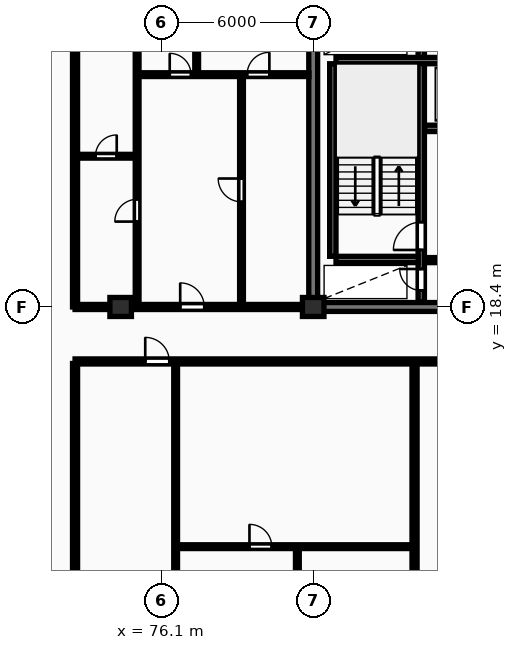
"""IFC4 building model, lengths in metres.
Left out: names, types, materials, properties, quantities, classifications, styles, units other than length and angle.
Written with IfcOpenShell. Run it as: python <this file> out.ifc"""

import sys

from ifc_helpers import new_model, si_unit, direction, frame, frame_2d, origin, origin_2d, place, context, subcontext, project, spatial, rectangle, extrude, element, fill, save


model = new_model("IFC4")
c1 = context("Model", 3, precision=1e-05, world=origin(), true_north=direction((0.0, 1.0)))
c2 = subcontext(c1, "Body", "Model", "MODEL_VIEW")
j1 = project(units=[si_unit("LENGTHUNIT", "METRE"), si_unit("PLANEANGLEUNIT", "RADIAN")], contexts=[c1])
p1 = place(None, origin())
s1 = spatial("IfcSite", under=j1, at=p1, CompositionType="ELEMENT")
p2 = place(p1, origin())
s2 = spatial("IfcBuilding", under=s1, at=p2, CompositionType="ELEMENT")
p3 = place(p2, frame((0.0, 0.0, 80.8)))
s3 = spatial("IfcBuildingStorey", under=s2, at=p3, CompositionType="ELEMENT", Elevation=80.8)
for number, where, z_axis, x_axis in (
    (1, (74.5, 18.4, 0.0), (0.0, 0.0, 1.0), (1.0, 0.0, 0.0)),
    (2, (82.1, 18.4, 0.0), (0.0, 0.0, 1.0), (1.0, 0.0, 0.0)),
):
    element("IfcColumn", number, at=place(p3, frame(where, z_axis=z_axis, x_axis=x_axis)), inside=s3, PredefinedType="COLUMN", context=c2, shape_type="SweptSolid", body=[
        extrude(rectangle(XDim=0.85, YDim=0.75, at=origin_2d()), origin(), (0.0, 0.0, 1.0), 3.25),
    ])
p4 = place(p3, frame((82.1, 18.575, 0.0), z_axis=(0.0, 0.0, 1.0), x_axis=(0.0, 1.0, 0.0)))
e3 = element("IfcWall", 3, at=p4, inside=s3, PredefinedType="SHEAR", context=c2, shape_type="SweptSolid", body=[
    extrude(rectangle(XDim=11.65, YDim=0.35, at=frame_2d((5.825, 0.0))), origin(), (0.0, 0.0, 1.0), 3.25),
])
p5 = place(p3, frame((81.925, 18.4, 0.0), z_axis=(0.0, 0.0, 1.0), x_axis=(1.0, 0.0, 0.0)))
e4 = element("IfcWall", 4, at=p5, inside=s3, PredefinedType="SHEAR", context=c2, shape_type="SweptSolid", body=[
    extrude(rectangle(XDim=36.265, YDim=0.35, at=frame_2d((18.132, 0.0))), origin(), (0.0, 0.0, 1.0), 3.25),
])
p6 = place(p5, frame((5.675, 0.0, 0.0)))
e5 = element("IfcOpeningElement", 5, at=p6, cuts=e4, PredefinedType="OPENING", context=c2, shape_type="SweptSolid", body=[
    extrude(rectangle(XDim=1.0, YDim=2.15, at=frame_2d((0.5, 1.075))), frame((0.0, 0.185, 0.0), z_axis=(0.0, -1.0, 0.0), x_axis=(1.0, 0.0, 0.0)), (0.0, 0.0, 1.0), 0.37),
])
p7 = place(p5, frame((21.925, 0.0, 0.0)))
e6 = element("IfcOpeningElement", 6, at=p7, cuts=e4, PredefinedType="OPENING", context=c2, shape_type="SweptSolid", body=[
    extrude(rectangle(XDim=1.5, YDim=2.2, at=frame_2d((0.75, 1.1))), frame((0.0, 0.185, 0.0), z_axis=(0.0, -1.0, 0.0), x_axis=(1.0, 0.0, 0.0)), (0.0, 0.0, 1.0), 0.37),
])
p8 = place(p5, frame((29.875, 0.0, 0.0)))
e7 = element("IfcOpeningElement", 7, at=p8, cuts=e4, PredefinedType="OPENING", context=c2, shape_type="SweptSolid", body=[
    extrude(rectangle(XDim=1.0, YDim=2.15, at=frame_2d((0.5, 1.075))), frame((0.0, 0.185, 0.0), z_axis=(0.0, -1.0, 0.0), x_axis=(1.0, 0.0, 0.0)), (0.0, 0.0, 1.0), 0.37),
])
p9 = place(p3, frame((82.875, 20.4, 0.0), z_axis=(0.0, 0.0, 1.0), x_axis=(0.0, 1.0, 0.0)))
e8 = element("IfcWall", 8, at=p9, inside=s3, PredefinedType="SHEAR", context=c2, shape_type="SweptSolid", body=[
    extrude(rectangle(XDim=7.6, YDim=0.25, at=frame_2d((3.8, 0.0))), origin(), (0.0, 0.0, 1.0), 3.25),
])
p10 = place(p3, frame((86.365, 18.6, 0.0), z_axis=(0.0, 0.0, 1.0), x_axis=(0.0, 1.0, 0.0)))
e9 = element("IfcWall", 9, at=p10, inside=s3, PredefinedType="SHEAR", context=c2, shape_type="SweptSolid", body=[
    extrude(rectangle(XDim=11.6, YDim=0.25, at=frame_2d((5.8, 0.0))), origin(), (0.0, 0.0, 1.0), 3.25),
])
p11 = place(p10, frame((0.45, 0.0, 0.0)))
e10 = element("IfcOpeningElement", 10, at=p11, cuts=e9, PredefinedType="OPENING", context=c2, shape_type="SweptSolid", body=[
    extrude(rectangle(XDim=0.85, YDim=2.05, at=frame_2d((0.425, 1.025))), frame((0.0, 0.135, 0.0), z_axis=(0.0, -1.0, 0.0), x_axis=(1.0, 0.0, 0.0)), (0.0, 0.0, 1.0), 0.27),
])
p12 = place(p10, frame((2.05, 0.0, 0.0)))
e11 = element("IfcOpeningElement", 11, at=p12, cuts=e9, PredefinedType="OPENING", context=c2, shape_type="SweptSolid", body=[
    extrude(rectangle(XDim=1.1, YDim=2.1, at=frame_2d((0.55, 1.05))), frame((0.0, 0.135, 0.0), z_axis=(0.0, -1.0, 0.0), x_axis=(1.0, 0.0, 0.0)), (0.0, 0.0, 1.0), 0.27),
])
p13 = place(p10, frame((9.95, 0.0, 0.0)))
e12 = element("IfcOpeningElement", 12, at=p13, cuts=e9, PredefinedType="OPENING", context=c2, shape_type="SweptSolid", body=[
    extrude(rectangle(XDim=0.85, YDim=2.05, at=frame_2d((0.425, 1.025))), frame((0.0, 0.135, 0.0), z_axis=(0.0, -1.0, 0.0), x_axis=(1.0, 0.0, 0.0)), (0.0, 0.0, 1.0), 0.27),
])
p14 = place(p3, frame((83.0, 20.275, 0.0), z_axis=(0.0, 0.0, 1.0), x_axis=(1.0, 0.0, 0.0)))
e13 = element("IfcWall", 13, at=p14, inside=s3, PredefinedType="SHEAR", context=c2, shape_type="SweptSolid", body=[
    extrude(rectangle(XDim=3.24, YDim=0.25, at=frame_2d((1.62, 0.0))), origin(), (0.0, 0.0, 1.0), 3.25),
])
p15 = place(p3, frame((83.0, 28.125, 0.0), z_axis=(0.0, 0.0, 1.0), x_axis=(1.0, 0.0, 0.0)))
e14 = element("IfcWall", 14, at=p15, inside=s3, PredefinedType="SHEAR", context=c2, shape_type="SweptSolid", body=[
    extrude(rectangle(XDim=7.82, YDim=0.25, at=frame_2d((3.91, 0.0))), origin(), (0.0, 0.0, 1.0), 3.25),
])
p16 = place(p3, frame((86.5, 25.45, 0.0), z_axis=(0.0, 0.0, 1.0), x_axis=(1.0, 0.0, 0.0)))
e15 = element("IfcWall", 15, at=p16, inside=s3, PredefinedType="SHEAR", context=c2, shape_type="SweptSolid", body=[
    extrude(rectangle(XDim=4.32, YDim=0.25, at=frame_2d((2.16, 0.0))), origin(), (0.0, 0.0, 1.0), 3.25),
])
p17 = place(p16, frame((1.14, 0.0, 0.0)))
e16 = element("IfcOpeningElement", 16, at=p17, cuts=e15, PredefinedType="OPENING", context=c2, shape_type="SweptSolid", body=[
    extrude(rectangle(XDim=1.12, YDim=2.12, at=frame_2d((0.56, 1.06))), frame((0.0, 0.135, 0.0), z_axis=(0.0, -1.0, 0.0), x_axis=(1.0, 0.0, 0.0)), (0.0, 0.0, 1.0), 0.27),
])
p18 = place(p16, frame((3.25, 0.0, 0.0)))
e17 = element("IfcOpeningElement", 17, at=p18, cuts=e15, PredefinedType="OPENING", context=c2, shape_type="SweptSolid", body=[
    extrude(rectangle(XDim=0.85, YDim=2.05, at=frame_2d((0.425, 1.025))), frame((0.0, 0.135, 0.0), z_axis=(0.0, -1.0, 0.0), x_axis=(1.0, 0.0, 0.0)), (0.0, 0.0, 1.0), 0.27),
])
p19 = place(p3, frame((86.5, 20.25, 0.0), z_axis=(0.0, 0.0, 1.0), x_axis=(1.0, 0.0, 0.0)))
e18 = element("IfcWall", 18, at=p19, inside=s3, PredefinedType="PARTITIONING", context=c2, shape_type="SweptSolid", body=[
    extrude(rectangle(XDim=4.32, YDim=0.2, at=frame_2d((2.16, 0.0))), origin(), (0.0, 0.0, 1.0), 2.97),
])
p20 = place(p19, frame((1.4, 0.0, 0.0)))
e19 = element("IfcOpeningElement", 19, at=p20, cuts=e18, PredefinedType="OPENING", context=c2, shape_type="SweptSolid", body=[
    extrude(rectangle(XDim=1.1, YDim=2.1, at=frame_2d((0.55, 1.05))), frame((0.0, 0.11, 0.0), z_axis=(0.0, -1.0, 0.0), x_axis=(1.0, 0.0, 0.0)), (0.0, 0.0, 1.0), 0.22),
])
p21 = place(p3, frame((72.7, 18.4, 0.0), z_axis=(0.0, 0.0, 1.0), x_axis=(0.0, 1.0, 0.0)))
e20 = element("IfcWall", 20, at=p21, inside=s3, PredefinedType="PARTITIONING", context=c2, shape_type="SweptSolid", body=[
    extrude(rectangle(XDim=14.1, YDim=0.2, at=frame_2d((7.05, 0.0))), origin(), (0.0, 0.0, 1.0), 2.97),
])
p22 = place(p3, frame((72.7, 24.35, 0.0), z_axis=(0.0, 0.0, 1.0), x_axis=(1.0, 0.0, 0.0)))
e21 = element("IfcWall", 21, at=p22, inside=s3, PredefinedType="PARTITIONING", context=c2, shape_type="SweptSolid", body=[
    extrude(rectangle(XDim=2.45, YDim=0.15, at=frame_2d((1.225, 0.0))), origin(), (0.0, 0.0, 1.0), 2.97),
])
p23 = place(p22, frame((0.805, 0.0, 0.0)))
e22 = element("IfcOpeningElement", 22, at=p23, cuts=e21, PredefinedType="OPENING", context=c2, shape_type="SweptSolid", body=[
    extrude(rectangle(XDim=0.84, YDim=2.04, at=frame_2d((0.42, 1.02))), frame((0.0, 0.085, 0.0), z_axis=(0.0, -1.0, 0.0), x_axis=(1.0, 0.0, 0.0)), (0.0, 0.0, 1.0), 0.17),
])
p24 = place(p3, frame((75.15, 18.45, 0.0), z_axis=(0.0, 0.0, 1.0), x_axis=(0.0, 1.0, 0.0)))
e23 = element("IfcWall", 23, at=p24, inside=s3, PredefinedType="PARTITIONING", context=c2, shape_type="SweptSolid", body=[
    extrude(rectangle(XDim=14.05, YDim=0.15, at=frame_2d((7.025, 0.0))), origin(), (0.0, 0.0, 1.0), 2.97),
])
p25 = place(p24, frame((3.32, 0.0, 0.0)))
e24 = element("IfcOpeningElement", 24, at=p25, cuts=e23, PredefinedType="OPENING", context=c2, shape_type="SweptSolid", body=[
    extrude(rectangle(XDim=0.88, YDim=2.06, at=frame_2d((0.44, 1.03))), frame((0.0, 0.085, 0.0), z_axis=(0.0, -1.0, 0.0), x_axis=(1.0, 0.0, 0.0)), (0.0, 0.0, 1.0), 0.17),
])
p26 = place(p3, frame((79.27, 18.45, 0.0), z_axis=(0.0, 0.0, 1.0), x_axis=(0.0, 1.0, 0.0)))
e25 = element("IfcWall", 25, at=p26, inside=s3, PredefinedType="PARTITIONING", context=c2, shape_type="SweptSolid", body=[
    extrude(rectangle(XDim=9.12, YDim=0.15, at=frame_2d((4.56, 0.0))), origin(), (0.0, 0.0, 1.0), 2.97),
])
p27 = place(p26, frame((4.1, 0.0, 0.0)))
e26 = element("IfcOpeningElement", 26, at=p27, cuts=e25, PredefinedType="OPENING", context=c2, shape_type="SweptSolid", body=[
    extrude(rectangle(XDim=0.92, YDim=2.08, at=frame_2d((0.46, 1.04))), frame((0.0, 0.085, 0.0), z_axis=(0.0, -1.0, 0.0), x_axis=(1.0, 0.0, 0.0)), (0.0, 0.0, 1.0), 0.17),
])
p28 = place(p3, frame((77.5, 27.57, 0.0), z_axis=(0.0, 0.0, 1.0), x_axis=(0.0, 1.0, 0.0)))
e27 = element("IfcWall", 27, at=p28, inside=s3, PredefinedType="PARTITIONING", context=c2, shape_type="SweptSolid", body=[
    extrude(rectangle(XDim=4.93, YDim=0.15, at=frame_2d((2.465, 0.0))), origin(), (0.0, 0.0, 1.0), 2.97),
])
p29 = place(p3, frame((75.17, 27.57, 0.0), z_axis=(0.0, 0.0, 1.0), x_axis=(1.0, 0.0, 0.0)))
e28 = element("IfcWall", 28, at=p29, inside=s3, PredefinedType="PARTITIONING", context=c2, shape_type="SweptSolid", body=[
    extrude(rectangle(XDim=6.76, YDim=0.15, at=frame_2d((3.38, 0.0))), origin(), (0.0, 0.0, 1.0), 2.97),
])
p30 = place(p29, frame((1.266, 0.0, 0.0)))
e29 = element("IfcOpeningElement", 29, at=p30, cuts=e28, PredefinedType="OPENING", context=c2, shape_type="SweptSolid", body=[
    extrude(rectangle(XDim=0.84, YDim=2.04, at=frame_2d((0.42, 1.02))), frame((0.0, 0.085, 0.0), z_axis=(0.0, -1.0, 0.0), x_axis=(1.0, 0.0, 0.0)), (0.0, 0.0, 1.0), 0.17),
])
p31 = place(p29, frame((4.32, 0.0, 0.0)))
e30 = element("IfcOpeningElement", 30, at=p31, cuts=e28, PredefinedType="OPENING", context=c2, shape_type="SweptSolid", body=[
    extrude(rectangle(XDim=0.88, YDim=2.06, at=frame_2d((0.44, 1.03))), frame((0.0, 0.085, 0.0), z_axis=(0.0, -1.0, 0.0), x_axis=(1.0, 0.0, 0.0)), (0.0, 0.0, 1.0), 0.17),
])
p32 = place(p3, frame((72.7, 18.4, 0.0), z_axis=(0.0, 0.0, 1.0), x_axis=(1.0, 0.0, 0.0)))
e31 = element("IfcWall", 31, at=p32, inside=s3, PredefinedType="PARTITIONING", context=c2, shape_type="SweptSolid", body=[
    extrude(rectangle(XDim=9.25, YDim=0.2, at=frame_2d((4.625, 0.0))), origin(), (0.0, 0.0, 1.0), 2.358),
])
p33 = place(p32, frame((4.15, 0.0, 0.0)))
e32 = element("IfcOpeningElement", 32, at=p33, cuts=e31, PredefinedType="OPENING", context=c2, shape_type="SweptSolid", body=[
    extrude(rectangle(XDim=0.95, YDim=2.15, at=frame_2d((0.475, 1.075))), frame((0.0, 0.11, 0.0), z_axis=(0.0, -1.0, 0.0), x_axis=(1.0, 0.0, 0.0)), (0.0, 0.0, 1.0), 0.22),
])
for number, where, z_axis, x_axis in (
    (33, (72.7, -8.7, 0.0), (0.0, 0.0, 1.0), (0.0, 1.0, 0.0)),
    (34, (86.1, -8.7, 0.0), (0.0, 0.0, 1.0), (0.0, 1.0, 0.0)),
):
    element("IfcWall", number, at=place(p3, frame(where, z_axis=z_axis, x_axis=x_axis)), inside=s3, PredefinedType="PARTITIONING", context=c2, shape_type="SweptSolid", body=[
        extrude(rectangle(XDim=24.87, YDim=0.2, at=frame_2d((12.435, 0.0))), origin(), (0.0, 0.0, 1.0), 2.97),
    ])
p34 = place(p3, frame((81.475, 1.69, 0.0), z_axis=(0.0, 0.0, 1.0), x_axis=(0.0, 1.0, 0.0)))
e35 = element("IfcWall", 35, at=p34, inside=s3, PredefinedType="PARTITIONING", context=c2, shape_type="SweptSolid", body=[
    extrude(rectangle(XDim=7.25, YDim=0.15, at=frame_2d((3.625, 0.0))), origin(), (0.0, 0.0, 1.0), 2.97),
])
p35 = place(p34, frame((2.558, 0.0, 0.0)))
e36 = element("IfcOpeningElement", 36, at=p35, cuts=e35, PredefinedType="OPENING", context=c2, shape_type="SweptSolid", body=[
    extrude(rectangle(XDim=0.84, YDim=2.04, at=frame_2d((0.42, 1.02))), frame((0.0, 0.085, 0.0), z_axis=(0.0, -1.0, 0.0), x_axis=(1.0, 0.0, 0.0)), (0.0, 0.0, 1.0), 0.17),
])
p36 = place(p3, frame((76.73, 8.94, 0.0), z_axis=(0.0, 0.0, 1.0), x_axis=(1.0, 0.0, 0.0)))
e37 = element("IfcWall", 37, at=p36, inside=s3, PredefinedType="PARTITIONING", context=c2, shape_type="SweptSolid", body=[
    extrude(rectangle(XDim=9.29, YDim=0.15, at=frame_2d((4.645, 0.0))), origin(), (0.0, 0.0, 1.0), 2.97),
])
p37 = place(p36, frame((2.854, 0.0, 0.0)))
e38 = element("IfcOpeningElement", 38, at=p37, cuts=e37, PredefinedType="OPENING", context=c2, shape_type="SweptSolid", body=[
    extrude(rectangle(XDim=0.88, YDim=2.06, at=frame_2d((0.44, 1.03))), frame((0.0, 0.085, 0.0), z_axis=(0.0, -1.0, 0.0), x_axis=(1.0, 0.0, 0.0)), (0.0, 0.0, 1.0), 0.17),
])
p38 = place(p3, frame((76.67, 1.69, 0.0), z_axis=(0.0, 0.0, 1.0), x_axis=(0.0, 1.0, 0.0)))
e39 = element("IfcWall", 39, at=p38, inside=s3, PredefinedType="PARTITIONING", context=c2, shape_type="SweptSolid", body=[
    extrude(rectangle(XDim=14.5, YDim=0.15, at=frame_2d((7.25, 0.0))), origin(), (0.0, 0.0, 1.0), 2.97),
])
p39 = place(p38, frame((2.542, 0.0, 0.0)))
e40 = element("IfcOpeningElement", 40, at=p39, cuts=e39, PredefinedType="OPENING", context=c2, shape_type="SweptSolid", body=[
    extrude(rectangle(XDim=0.88, YDim=2.06, at=frame_2d((0.44, 1.03))), frame((0.0, 0.085, 0.0), z_axis=(0.0, -1.0, 0.0), x_axis=(1.0, 0.0, 0.0)), (0.0, 0.0, 1.0), 0.17),
])
p40 = place(p3, frame((72.7, 16.25, 0.0), z_axis=(0.0, 0.0, 1.0), x_axis=(1.0, 0.0, 0.0)))
e41 = element("IfcWall", 41, at=p40, inside=s3, PredefinedType="PARTITIONING", context=c2, shape_type="SweptSolid", body=[
    extrude(rectangle(XDim=58.0, YDim=0.2, at=frame_2d((29.0, 0.0))), origin(), (0.0, 0.0, 1.0), 2.97),
])
p41 = place(p40, frame((2.77, 0.0, 0.0)))
e42 = element("IfcOpeningElement", 42, at=p41, cuts=e41, PredefinedType="OPENING", context=c2, shape_type="SweptSolid", body=[
    extrude(rectangle(XDim=0.95, YDim=2.15, at=frame_2d((0.475, 1.075))), frame((0.0, 0.11, 0.0), z_axis=(0.0, -1.0, 0.0), x_axis=(1.0, 0.0, 0.0)), (0.0, 0.0, 1.0), 0.22),
])
p42 = place(p40, frame((15.445, 0.0, 0.0)))
e43 = element("IfcOpeningElement", 43, at=p42, cuts=e41, PredefinedType="OPENING", context=c2, shape_type="SweptSolid", body=[
    extrude(rectangle(XDim=0.95, YDim=2.15, at=frame_2d((0.475, 1.075))), frame((0.0, 0.11, 0.0), z_axis=(0.0, -1.0, 0.0), x_axis=(1.0, 0.0, 0.0)), (0.0, 0.0, 1.0), 0.22),
])
p43 = place(p40, frame((33.245, 0.0, 0.0)))
e44 = element("IfcOpeningElement", 44, at=p43, cuts=e41, PredefinedType="OPENING", context=c2, shape_type="SweptSolid", body=[
    extrude(rectangle(XDim=0.95, YDim=2.15, at=frame_2d((0.475, 1.075))), frame((0.0, 0.11, 0.0), z_axis=(0.0, -1.0, 0.0), x_axis=(1.0, 0.0, 0.0)), (0.0, 0.0, 1.0), 0.22),
])
p44 = place(p40, frame((47.645, 0.0, 0.0)))
e45 = element("IfcOpeningElement", 45, at=p44, cuts=e41, PredefinedType="OPENING", context=c2, shape_type="SweptSolid", body=[
    extrude(rectangle(XDim=0.95, YDim=2.15, at=frame_2d((0.475, 1.075))), frame((0.0, 0.11, 0.0), z_axis=(0.0, -1.0, 0.0), x_axis=(1.0, 0.0, 0.0)), (0.0, 0.0, 1.0), 0.22),
])
p45 = place(p11, origin())
e46 = element("IfcDoor", 46, at=p45, inside=s3, OperationType="SINGLE_SWING_RIGHT", PredefinedType="DOOR", context=c2, shape_type="SweptSolid", body=[
    extrude(rectangle(XDim=0.85, YDim=2.05, at=frame_2d((0.425, 1.025))), frame((0.0, 0.025, 0.0), z_axis=(0.0, -1.0, 0.0), x_axis=(1.0, 0.0, 0.0)), (0.0, 0.0, 1.0), 0.05),
])
fill(e10, e46)
p46 = place(p12, origin())
e47 = element("IfcDoor", 47, at=p46, inside=s3, OperationType="SINGLE_SWING_LEFT", PredefinedType="DOOR", context=c2, shape_type="SweptSolid", body=[
    extrude(rectangle(XDim=1.1, YDim=2.1, at=frame_2d((0.55, 1.05))), frame((0.0, 0.025, 0.0), z_axis=(0.0, -1.0, 0.0), x_axis=(1.0, 0.0, 0.0)), (0.0, 0.0, 1.0), 0.05),
])
fill(e11, e47)
p47 = place(p23, origin())
e48 = element("IfcDoor", 48, at=p47, inside=s3, OperationType="SINGLE_SWING_RIGHT", PredefinedType="DOOR", context=c2, shape_type="SweptSolid", body=[
    extrude(rectangle(XDim=0.84, YDim=2.04, at=frame_2d((0.42, 1.02))), frame((0.0, 0.025, 0.0), z_axis=(0.0, -1.0, 0.0), x_axis=(1.0, 0.0, 0.0)), (0.0, 0.0, 1.0), 0.05),
])
fill(e22, e48)
p48 = place(p25, origin())
e49 = element("IfcDoor", 49, at=p48, inside=s3, OperationType="SINGLE_SWING_LEFT", PredefinedType="DOOR", context=c2, shape_type="SweptSolid", body=[
    extrude(rectangle(XDim=0.88, YDim=2.06, at=frame_2d((0.44, 1.03))), frame((0.0, 0.025, 0.0), z_axis=(0.0, -1.0, 0.0), x_axis=(1.0, 0.0, 0.0)), (0.0, 0.0, 1.0), 0.05),
])
fill(e24, e49)
p49 = place(p27, origin())
e50 = element("IfcDoor", 50, at=p49, inside=s3, OperationType="SINGLE_SWING_RIGHT", PredefinedType="DOOR", context=c2, shape_type="SweptSolid", body=[
    extrude(rectangle(XDim=0.92, YDim=2.08, at=frame_2d((0.46, 1.04))), frame((0.0, 0.025, 0.0), z_axis=(0.0, -1.0, 0.0), x_axis=(1.0, 0.0, 0.0)), (0.0, 0.0, 1.0), 0.05),
])
fill(e26, e50)
p50 = place(p30, origin())
e51 = element("IfcDoor", 51, at=p50, inside=s3, OperationType="SINGLE_SWING_LEFT", PredefinedType="DOOR", context=c2, shape_type="SweptSolid", body=[
    extrude(rectangle(XDim=0.84, YDim=2.04, at=frame_2d((0.42, 1.02))), frame((0.0, 0.025, 0.0), z_axis=(0.0, -1.0, 0.0), x_axis=(1.0, 0.0, 0.0)), (0.0, 0.0, 1.0), 0.05),
])
fill(e29, e51)
p51 = place(p31, origin())
e52 = element("IfcDoor", 52, at=p51, inside=s3, OperationType="SINGLE_SWING_RIGHT", PredefinedType="DOOR", context=c2, shape_type="SweptSolid", body=[
    extrude(rectangle(XDim=0.88, YDim=2.06, at=frame_2d((0.44, 1.03))), frame((0.0, 0.025, 0.0), z_axis=(0.0, -1.0, 0.0), x_axis=(1.0, 0.0, 0.0)), (0.0, 0.0, 1.0), 0.05),
])
fill(e30, e52)
p52 = place(p33, origin())
e53 = element("IfcDoor", 53, at=p52, inside=s3, OperationType="SINGLE_SWING_LEFT", PredefinedType="DOOR", context=c2, shape_type="SweptSolid", body=[
    extrude(rectangle(XDim=0.95, YDim=2.15, at=frame_2d((0.475, 1.075))), frame((0.0, 0.025, 0.0), z_axis=(0.0, -1.0, 0.0), x_axis=(1.0, 0.0, 0.0)), (0.0, 0.0, 1.0), 0.05),
])
fill(e32, e53)
p53 = place(p37, origin())
e54 = element("IfcDoor", 54, at=p53, inside=s3, OperationType="SINGLE_SWING_LEFT", PredefinedType="DOOR", context=c2, shape_type="SweptSolid", body=[
    extrude(rectangle(XDim=0.88, YDim=2.06, at=frame_2d((0.44, 1.03))), frame((0.0, 0.025, 0.0), z_axis=(0.0, -1.0, 0.0), x_axis=(1.0, 0.0, 0.0)), (0.0, 0.0, 1.0), 0.05),
])
fill(e38, e54)
p54 = place(p41, origin())
e55 = element("IfcDoor", 55, at=p54, inside=s3, OperationType="SINGLE_SWING_LEFT", PredefinedType="DOOR", context=c2, shape_type="SweptSolid", body=[
    extrude(rectangle(XDim=0.95, YDim=2.15, at=frame_2d((0.475, 1.075))), frame((0.0, 0.025, 0.0), z_axis=(0.0, -1.0, 0.0), x_axis=(1.0, 0.0, 0.0)), (0.0, 0.0, 1.0), 0.05),
])
fill(e42, e55)
save(model, sys.argv[1])
